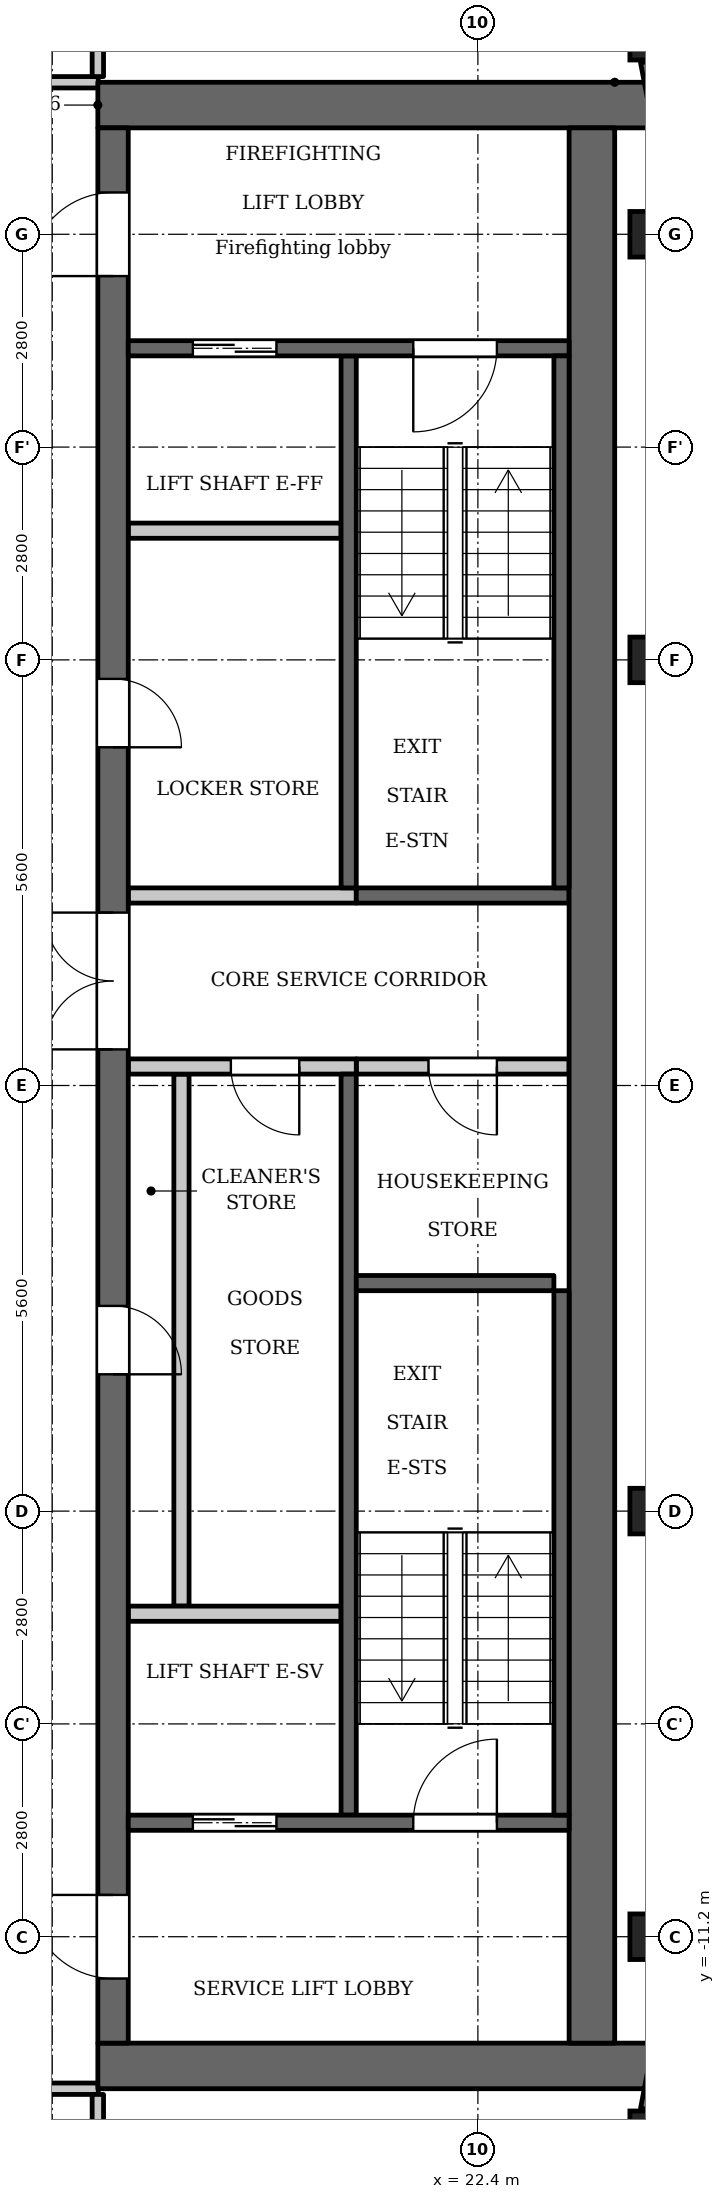
"""IFC4 building model, lengths in metres.
Left out: names, types, materials, properties, quantities, classifications, styles, units other than length and angle.
Written with IfcOpenShell. Run it as: python <this file> out.ifc"""

import sys

from ifc_helpers import new_model, si_unit, direction, frame, frame_2d, origin, origin_2d, place, context, subcontext, project, spatial, rectangle, extrude, element, fill, save


model = new_model("IFC4")
c1 = context("Model", 3, precision=1e-05, world=origin(), true_north=direction((0.0, 1.0)))
c2 = subcontext(c1, "Body", "Model", "MODEL_VIEW")
j1 = project(units=[si_unit("LENGTHUNIT", "METRE"), si_unit("PLANEANGLEUNIT", "RADIAN")], contexts=[c1])
p1 = place(None, origin())
s1 = spatial("IfcSite", under=j1, at=p1, CompositionType="ELEMENT")
p2 = place(p1, origin())
s2 = spatial("IfcBuilding", under=s1, at=p2, CompositionType="ELEMENT")
p3 = place(p2, frame((0.0, 0.0, 306.9)))
s3 = spatial("IfcBuildingStorey", under=s2, at=p3, CompositionType="ELEMENT", Elevation=306.9)
for number, where, z_axis, x_axis in (
    (1, (24.7, -13.793, 0.0), (0.0, 0.0, 1.0), (1.0, 0.0, 0.0)),
    (2, (24.7, -11.2, 0.0), (0.0, 0.0, 1.0), (1.0, 0.0, 0.0)),
    (3, (24.7, -5.6, 0.0), (0.0, 0.0, 1.0), (1.0, 0.0, 0.0)),
    (4, (24.7, 5.6, 0.0), (0.0, 0.0, 1.0), (1.0, 0.0, 0.0)),
    (5, (24.7, 11.2, 0.0), (0.0, 0.0, 1.0), (1.0, 0.0, 0.0)),
    (6, (24.7, 13.793, 0.0), (0.0, 0.0, 1.0), (1.0, 0.0, 0.0)),
):
    element("IfcColumn", number, at=place(p3, frame(where, z_axis=z_axis, x_axis=x_axis)), inside=s3, PredefinedType="COLUMN", context=c2, shape_type="SweptSolid", body=[
        extrude(rectangle(XDim=0.6, YDim=0.6, at=origin_2d()), origin(), (0.0, 0.0, 1.0), 3.5),
    ])
for number, where, z_axis, x_axis in (
    (7, (24.688, -13.485, 0.0), (0.0, 0.0, 1.0), (0.187, 0.982, 0.0)),
    (8, (25.052, 11.573, 0.0), (0.0, 0.0, 1.0), (-0.187, 0.982, 0.0)),
):
    element("IfcWall", number, at=place(p3, frame(where, z_axis=z_axis, x_axis=x_axis)), inside=s3, PredefinedType="SOLIDWALL", context=c2, shape_type="SweptSolid", body=[
        extrude(rectangle(XDim=1.947, YDim=0.3, at=frame_2d((0.973, 0.0))), origin(), (0.0, 0.0, 1.0), 2.6),
    ])
p4 = place(p3, frame((20.7, 2.6, 0.0), z_axis=(0.0, 0.0, 1.0), x_axis=(0.0, 1.0, 0.0)))
e9 = element("IfcWall", 9, at=p4, inside=s3, PredefinedType="SHEAR", context=c2, shape_type="SweptSolid", body=[
    extrude(rectangle(XDim=7.0, YDim=0.2, at=frame_2d((3.5, 0.0))), origin(), (0.0, 0.0, 1.0), 3.2),
])
p5 = place(p3, frame((20.7, -9.6, 0.0), z_axis=(0.0, 0.0, 1.0), x_axis=(0.0, 1.0, 0.0)))
e10 = element("IfcWall", 10, at=p5, inside=s3, PredefinedType="SHEAR", context=c2, shape_type="SweptSolid", body=[
    extrude(rectangle(XDim=9.75, YDim=0.2, at=frame_2d((4.875, 0.0))), origin(), (0.0, 0.0, 1.0), 3.2),
])
p6 = place(p3, frame((20.8, 2.5, 0.0), z_axis=(0.0, 0.0, 1.0), x_axis=(1.0, 0.0, 0.0)))
e11 = element("IfcWall", 11, at=p6, inside=s3, PredefinedType="SHEAR", context=c2, shape_type="SweptSolid", body=[
    extrude(rectangle(XDim=2.8, YDim=0.2, at=frame_2d((1.4, 0.0))), origin(), (0.0, 0.0, 1.0), 3.2),
])
p7 = place(p3, frame((20.8, 0.25, 0.0), z_axis=(0.0, 0.0, 1.0), x_axis=(1.0, 0.0, 0.0)))
e12 = element("IfcWall", 12, at=p7, inside=s3, PredefinedType="PARTITIONING", context=c2, shape_type="SweptSolid", body=[
    extrude(rectangle(XDim=2.8, YDim=0.2, at=frame_2d((1.4, 0.0))), origin(), (0.0, 0.0, 1.0), 3.2),
])
p8 = place(p7, frame((0.95, 0.0, 0.0)))
e13 = element("IfcOpeningElement", 13, at=p8, cuts=e12, PredefinedType="OPENING", context=c2, shape_type="SweptSolid", body=[
    extrude(rectangle(XDim=0.9, YDim=2.1, at=frame_2d((0.45, 1.05))), frame((0.0, 0.11, 0.0), z_axis=(0.0, -1.0, 0.0), x_axis=(1.0, 0.0, 0.0)), (0.0, 0.0, 1.0), 0.22),
])
for number, where, z_axis, x_axis in (
    (14, (17.4, 12.9, 0.0), (0.0, 0.0, 1.0), (1.0, 0.0, 0.0)),
    (15, (17.4, -12.9, 0.0), (0.0, 0.0, 1.0), (1.0, 0.0, 0.0)),
):
    element("IfcWall", number, at=place(p3, frame(where, z_axis=z_axis, x_axis=x_axis)), inside=s3, PredefinedType="SHEAR", context=c2, shape_type="SweptSolid", body=[
        extrude(rectangle(XDim=7.6, YDim=0.6, at=frame_2d((3.8, 0.0))), origin(), (0.0, 0.0, 1.0), 3.2),
    ])
p9 = place(p3, frame((18.5, -6.85, 0.0), z_axis=(0.0, 0.0, 1.0), x_axis=(0.0, 1.0, 0.0)))
e16 = element("IfcWall", 16, at=p9, inside=s3, PredefinedType="PARTITIONING", context=c2, shape_type="SweptSolid", body=[
    extrude(rectangle(XDim=7.0, YDim=0.2, at=frame_2d((3.5, 0.0))), origin(), (0.0, 0.0, 1.0), 3.2),
])
p10 = place(p3, frame((17.6, -12.6, 0.0), z_axis=(0.0, 0.0, 1.0), x_axis=(0.0, 1.0, 0.0)))
e17 = element("IfcWall", 17, at=p10, inside=s3, PredefinedType="SHEAR", context=c2, shape_type="SweptSolid", body=[
    extrude(rectangle(XDim=25.2, YDim=0.4, at=frame_2d((12.6, 0.0))), origin(), (0.0, 0.0, 1.0), 3.2),
])
p11 = place(p10, frame((8.8, 0.0, 0.0)))
e18 = element("IfcOpeningElement", 18, at=p11, cuts=e17, PredefinedType="OPENING", context=c2, shape_type="SweptSolid", body=[
    extrude(rectangle(XDim=0.9, YDim=2.1, at=frame_2d((0.45, 1.05))), frame((0.0, 0.21, 0.0), z_axis=(0.0, -1.0, 0.0), x_axis=(1.0, 0.0, 0.0)), (0.0, 0.0, 1.0), 0.42),
])
p12 = place(p10, frame((17.05, 0.0, 0.0)))
e19 = element("IfcOpeningElement", 19, at=p12, cuts=e17, PredefinedType="OPENING", context=c2, shape_type="SweptSolid", body=[
    extrude(rectangle(XDim=0.9, YDim=2.1, at=frame_2d((0.45, 1.05))), frame((0.0, 0.21, 0.0), z_axis=(0.0, -1.0, 0.0), x_axis=(1.0, 0.0, 0.0)), (0.0, 0.0, 1.0), 0.42),
])
p13 = place(p10, frame((23.25, 0.0, 0.0)))
e20 = element("IfcOpeningElement", 20, at=p13, cuts=e17, PredefinedType="OPENING", context=c2, shape_type="SweptSolid", body=[
    extrude(rectangle(XDim=1.1, YDim=2.1, at=frame_2d((0.55, 1.05))), frame((0.0, 0.21, 0.0), z_axis=(0.0, -1.0, 0.0), x_axis=(1.0, 0.0, 0.0)), (0.0, 0.0, 1.0), 0.42),
])
p14 = place(p10, frame((0.85, 0.0, 0.0)))
e21 = element("IfcOpeningElement", 21, at=p14, cuts=e17, PredefinedType="OPENING", context=c2, shape_type="SweptSolid", body=[
    extrude(rectangle(XDim=1.1, YDim=2.1, at=frame_2d((0.55, 1.05))), frame((0.0, 0.21, 0.0), z_axis=(0.0, -1.0, 0.0), x_axis=(1.0, 0.0, 0.0)), (0.0, 0.0, 1.0), 0.42),
])
p15 = place(p10, frame((13.075, 0.0, 0.0)))
e22 = element("IfcOpeningElement", 22, at=p15, cuts=e17, PredefinedType="OPENING", context=c2, shape_type="SweptSolid", body=[
    extrude(rectangle(XDim=1.8, YDim=2.1, at=frame_2d((0.9, 1.05))), frame((0.0, 0.21, 0.0), z_axis=(0.0, -1.0, 0.0), x_axis=(1.0, 0.0, 0.0)), (0.0, 0.0, 1.0), 0.42),
])
p16 = place(p3, frame((23.9, -12.6, 0.0), z_axis=(0.0, 0.0, 1.0), x_axis=(0.0, 1.0, 0.0)))
e23 = element("IfcWall", 23, at=p16, inside=s3, PredefinedType="SHEAR", context=c2, shape_type="SweptSolid", body=[
    extrude(rectangle(XDim=25.2, YDim=0.6, at=frame_2d((12.6, 0.0))), origin(), (0.0, 0.0, 1.0), 3.2),
])
p17 = place(p3, frame((17.8, -9.7, 0.0), z_axis=(0.0, 0.0, 1.0), x_axis=(1.0, 0.0, 0.0)))
e24 = element("IfcWall", 24, at=p17, inside=s3, PredefinedType="SHEAR", context=c2, shape_type="SweptSolid", body=[
    extrude(rectangle(XDim=5.8, YDim=0.2, at=frame_2d((2.9, 0.0))), origin(), (0.0, 0.0, 1.0), 3.2),
])
p18 = place(p17, frame((0.85, 0.0, 0.0)))
e25 = element("IfcOpeningElement", 25, at=p18, cuts=e24, PredefinedType="OPENING", context=c2, shape_type="SweptSolid", body=[
    extrude(rectangle(XDim=1.1, YDim=2.1, at=frame_2d((0.55, 1.05))), frame((0.0, 0.11, 0.0), z_axis=(0.0, -1.0, 0.0), x_axis=(1.0, 0.0, 0.0)), (0.0, 0.0, 1.0), 0.22),
])
p19 = place(p17, frame((3.75, 0.0, 0.0)))
e26 = element("IfcOpeningElement", 26, at=p19, cuts=e24, PredefinedType="OPENING", context=c2, shape_type="SweptSolid", body=[
    extrude(rectangle(XDim=1.1, YDim=2.1, at=frame_2d((0.55, 1.05))), frame((0.0, 0.11, 0.0), z_axis=(0.0, -1.0, 0.0), x_axis=(1.0, 0.0, 0.0)), (0.0, 0.0, 1.0), 0.22),
])
p20 = place(p3, frame((17.8, -6.95, 0.0), z_axis=(0.0, 0.0, 1.0), x_axis=(1.0, 0.0, 0.0)))
e27 = element("IfcWall", 27, at=p20, inside=s3, PredefinedType="PARTITIONING", context=c2, shape_type="SweptSolid", body=[
    extrude(rectangle(XDim=2.8, YDim=0.2, at=frame_2d((1.4, 0.0))), origin(), (0.0, 0.0, 1.0), 3.2),
])
p21 = place(p3, frame((17.8, 0.25, 0.0), z_axis=(0.0, 0.0, 1.0), x_axis=(1.0, 0.0, 0.0)))
e28 = element("IfcWall", 28, at=p21, inside=s3, PredefinedType="PARTITIONING", context=c2, shape_type="SweptSolid", body=[
    extrude(rectangle(XDim=3.0, YDim=0.2, at=frame_2d((1.5, 0.0))), origin(), (0.0, 0.0, 1.0), 3.2),
])
p22 = place(p21, frame((1.35, 0.0, 0.0)))
e29 = element("IfcOpeningElement", 29, at=p22, cuts=e28, PredefinedType="OPENING", context=c2, shape_type="SweptSolid", body=[
    extrude(rectangle(XDim=0.9, YDim=2.1, at=frame_2d((0.45, 1.05))), frame((0.0, 0.11, 0.0), z_axis=(0.0, -1.0, 0.0), x_axis=(1.0, 0.0, 0.0)), (0.0, 0.0, 1.0), 0.22),
])
p23 = place(p3, frame((17.8, 2.5, 0.0), z_axis=(0.0, 0.0, 1.0), x_axis=(1.0, 0.0, 0.0)))
e30 = element("IfcWall", 30, at=p23, inside=s3, PredefinedType="PARTITIONING", context=c2, shape_type="SweptSolid", body=[
    extrude(rectangle(XDim=3.0, YDim=0.2, at=frame_2d((1.5, 0.0))), origin(), (0.0, 0.0, 1.0), 3.2),
])
p24 = place(p3, frame((17.8, 7.3, 0.0), z_axis=(0.0, 0.0, 1.0), x_axis=(1.0, 0.0, 0.0)))
e31 = element("IfcWall", 31, at=p24, inside=s3, PredefinedType="PARTITIONING", context=c2, shape_type="SweptSolid", body=[
    extrude(rectangle(XDim=2.8, YDim=0.2, at=frame_2d((1.4, 0.0))), origin(), (0.0, 0.0, 1.0), 3.2),
])
p25 = place(p3, frame((17.8, 9.7, 0.0), z_axis=(0.0, 0.0, 1.0), x_axis=(1.0, 0.0, 0.0)))
e32 = element("IfcWall", 32, at=p25, inside=s3, PredefinedType="SHEAR", context=c2, shape_type="SweptSolid", body=[
    extrude(rectangle(XDim=5.8, YDim=0.2, at=frame_2d((2.9, 0.0))), origin(), (0.0, 0.0, 1.0), 3.2),
])
p26 = place(p25, frame((0.85, 0.0, 0.0)))
e33 = element("IfcOpeningElement", 33, at=p26, cuts=e32, PredefinedType="OPENING", context=c2, shape_type="SweptSolid", body=[
    extrude(rectangle(XDim=1.1, YDim=2.1, at=frame_2d((0.55, 1.05))), frame((0.0, 0.11, 0.0), z_axis=(0.0, -1.0, 0.0), x_axis=(1.0, 0.0, 0.0)), (0.0, 0.0, 1.0), 0.22),
])
p27 = place(p25, frame((3.75, 0.0, 0.0)))
e34 = element("IfcOpeningElement", 34, at=p27, cuts=e32, PredefinedType="OPENING", context=c2, shape_type="SweptSolid", body=[
    extrude(rectangle(XDim=1.1, YDim=2.1, at=frame_2d((0.55, 1.05))), frame((0.0, 0.11, 0.0), z_axis=(0.0, -1.0, 0.0), x_axis=(1.0, 0.0, 0.0)), (0.0, 0.0, 1.0), 0.22),
])
p28 = place(p3, frame((23.5, 2.6, 0.0), z_axis=(0.0, 0.0, 1.0), x_axis=(0.0, 1.0, 0.0)))
e35 = element("IfcWall", 35, at=p28, inside=s3, PredefinedType="SHEAR", context=c2, shape_type="SweptSolid", body=[
    extrude(rectangle(XDim=7.0, YDim=0.2, at=frame_2d((3.5, 0.0))), origin(), (0.0, 0.0, 1.0), 3.2),
])
p29 = place(p3, frame((23.5, -9.6, 0.0), z_axis=(0.0, 0.0, 1.0), x_axis=(0.0, 1.0, 0.0)))
e36 = element("IfcWall", 36, at=p29, inside=s3, PredefinedType="SHEAR", context=c2, shape_type="SweptSolid", body=[
    extrude(rectangle(XDim=6.9, YDim=0.2, at=frame_2d((3.45, 0.0))), origin(), (0.0, 0.0, 1.0), 3.2),
])
p30 = place(p3, frame((20.8, -2.6, 0.0), z_axis=(0.0, 0.0, 1.0), x_axis=(1.0, 0.0, 0.0)))
e37 = element("IfcWall", 37, at=p30, inside=s3, PredefinedType="SHEAR", context=c2, shape_type="SweptSolid", body=[
    extrude(rectangle(XDim=2.6, YDim=0.2, at=frame_2d((1.3, 0.0))), origin(), (0.0, 0.0, 1.0), 3.2),
])
p31 = place(p3, frame((15.32, -13.2, 0.0), z_axis=(0.0, 0.0, 1.0), x_axis=(1.0, 0.0, 0.0)))
e38 = element("IfcWall", 38, at=p31, inside=s3, PredefinedType="PARTITIONING", context=c2, shape_type="SweptSolid", body=[
    extrude(rectangle(XDim=2.085, YDim=0.15, at=frame_2d((1.042, 0.0))), origin(), (0.0, 0.0, 1.0), 3.2),
])
p32 = place(p31, frame((0.42, 0.0, 0.0)))
e39 = element("IfcOpeningElement", 39, at=p32, cuts=e38, PredefinedType="OPENING", context=c2, shape_type="SweptSolid", body=[
    extrude(rectangle(XDim=1.0, YDim=2.1, at=frame_2d((0.5, 1.05))), frame((0.0, 0.085, 0.0), z_axis=(0.0, -1.0, 0.0), x_axis=(1.0, 0.0, 0.0)), (0.0, 0.0, 1.0), 0.17),
])
p33 = place(p3, frame((15.32, 13.2, 0.0), z_axis=(0.0, 0.0, 1.0), x_axis=(1.0, 0.0, 0.0)))
e40 = element("IfcWall", 40, at=p33, inside=s3, PredefinedType="PARTITIONING", context=c2, shape_type="SweptSolid", body=[
    extrude(rectangle(XDim=2.085, YDim=0.15, at=frame_2d((1.042, 0.0))), origin(), (0.0, 0.0, 1.0), 3.2),
])
p34 = place(p33, frame((0.43, 0.0, 0.0)))
e41 = element("IfcOpeningElement", 41, at=p34, cuts=e40, PredefinedType="OPENING", context=c2, shape_type="SweptSolid", body=[
    extrude(rectangle(XDim=1.0, YDim=2.1, at=frame_2d((0.5, 1.05))), frame((0.0, 0.085, 0.0), z_axis=(0.0, -1.0, 0.0), x_axis=(1.0, 0.0, 0.0)), (0.0, 0.0, 1.0), 0.17),
])
p35 = place(p3, frame((17.4, -19.236, 0.0), z_axis=(0.0, 0.0, 1.0), x_axis=(0.0, 1.0, 0.0)))
e42 = element("IfcWall", 42, at=p35, inside=s3, PredefinedType="PARTITIONING", context=c2, shape_type="SweptSolid", body=[
    extrude(rectangle(XDim=5.961, YDim=0.15, at=frame_2d((2.981, 0.0))), origin(), (0.0, 0.0, 1.0), 3.2),
])
p36 = place(p35, frame((3.917, 0.0, 0.0)))
e43 = element("IfcOpeningElement", 43, at=p36, cuts=e42, PredefinedType="OPENING", context=c2, shape_type="SweptSolid", body=[
    extrude(rectangle(XDim=1.0, YDim=2.1, at=frame_2d((0.5, 1.05))), frame((0.0, 0.085, 0.0), z_axis=(0.0, -1.0, 0.0), x_axis=(1.0, 0.0, 0.0)), (0.0, 0.0, 1.0), 0.17),
])
p37 = place(p3, frame((17.4, 13.275, 0.0), z_axis=(0.0, 0.0, 1.0), x_axis=(0.0, 1.0, 0.0)))
e44 = element("IfcWall", 44, at=p37, inside=s3, PredefinedType="PARTITIONING", context=c2, shape_type="SweptSolid", body=[
    extrude(rectangle(XDim=5.961, YDim=0.15, at=frame_2d((2.981, 0.0))), origin(), (0.0, 0.0, 1.0), 3.2),
])
p38 = place(p37, frame((4.575, 0.0, 0.0)))
e45 = element("IfcOpeningElement", 45, at=p38, cuts=e44, PredefinedType="OPENING", context=c2, shape_type="SweptSolid", body=[
    extrude(rectangle(XDim=1.0, YDim=2.1, at=frame_2d((0.5, 1.05))), frame((0.0, 0.085, 0.0), z_axis=(0.0, -1.0, 0.0), x_axis=(1.0, 0.0, 0.0)), (0.0, 0.0, 1.0), 0.17),
])
p39 = place(p18, origin())
e46 = element("IfcDoor", 46, at=p39, inside=s3, OperationType="DOUBLE_DOOR_SLIDING", PredefinedType="DOOR", context=c2, shape_type="SweptSolid", body=[
    extrude(rectangle(XDim=1.1, YDim=2.1, at=frame_2d((0.55, 1.05))), frame((0.0, 0.025, 0.0), z_axis=(0.0, -1.0, 0.0), x_axis=(1.0, 0.0, 0.0)), (0.0, 0.0, 1.0), 0.05),
])
fill(e25, e46)
p40 = place(p11, origin())
e47 = element("IfcDoor", 47, at=p40, inside=s3, OperationType="SINGLE_SWING_LEFT", PredefinedType="DOOR", context=c2, shape_type="SweptSolid", body=[
    extrude(rectangle(XDim=0.9, YDim=2.1, at=frame_2d((0.45, 1.05))), frame((0.0, 0.025, 0.0), z_axis=(0.0, -1.0, 0.0), x_axis=(1.0, 0.0, 0.0)), (0.0, 0.0, 1.0), 0.05),
])
fill(e18, e47)
p41 = place(p22, origin())
e48 = element("IfcDoor", 48, at=p41, inside=s3, OperationType="SINGLE_SWING_RIGHT", PredefinedType="DOOR", context=c2, shape_type="SweptSolid", body=[
    extrude(rectangle(XDim=0.9, YDim=2.1, at=frame_2d((0.45, 1.05))), frame((0.0, 0.025, 0.0), z_axis=(0.0, -1.0, 0.0), x_axis=(1.0, 0.0, 0.0)), (0.0, 0.0, 1.0), 0.05),
])
fill(e29, e48)
p42 = place(p12, origin())
e49 = element("IfcDoor", 49, at=p42, inside=s3, OperationType="SINGLE_SWING_LEFT", PredefinedType="DOOR", context=c2, shape_type="SweptSolid", body=[
    extrude(rectangle(XDim=0.9, YDim=2.1, at=frame_2d((0.45, 1.05))), frame((0.0, 0.025, 0.0), z_axis=(0.0, -1.0, 0.0), x_axis=(1.0, 0.0, 0.0)), (0.0, 0.0, 1.0), 0.05),
])
fill(e19, e49)
p43 = place(p26, origin())
e50 = element("IfcDoor", 50, at=p43, inside=s3, OperationType="DOUBLE_DOOR_SLIDING", PredefinedType="DOOR", context=c2, shape_type="SweptSolid", body=[
    extrude(rectangle(XDim=1.1, YDim=2.1, at=frame_2d((0.55, 1.05))), frame((0.0, 0.025, 0.0), z_axis=(0.0, -1.0, 0.0), x_axis=(1.0, 0.0, 0.0)), (0.0, 0.0, 1.0), 0.05),
])
fill(e33, e50)
p44 = place(p13, origin())
e51 = element("IfcDoor", 51, at=p44, inside=s3, OperationType="SINGLE_SWING_RIGHT", PredefinedType="DOOR", context=c2, shape_type="SweptSolid", body=[
    extrude(rectangle(XDim=1.1, YDim=2.1, at=frame_2d((0.55, 1.05))), frame((0.0, 0.025, 0.0), z_axis=(0.0, -1.0, 0.0), x_axis=(1.0, 0.0, 0.0)), (0.0, 0.0, 1.0), 0.05),
])
fill(e20, e51)
p45 = place(p14, origin())
e52 = element("IfcDoor", 52, at=p45, inside=s3, OperationType="SINGLE_SWING_LEFT", PredefinedType="DOOR", context=c2, shape_type="SweptSolid", body=[
    extrude(rectangle(XDim=1.1, YDim=2.1, at=frame_2d((0.55, 1.05))), frame((0.0, 0.025, 0.0), z_axis=(0.0, -1.0, 0.0), x_axis=(1.0, 0.0, 0.0)), (0.0, 0.0, 1.0), 0.05),
])
fill(e21, e52)
p46 = place(p27, origin())
e53 = element("IfcDoor", 53, at=p46, inside=s3, OperationType="SINGLE_SWING_LEFT", PredefinedType="DOOR", context=c2, shape_type="SweptSolid", body=[
    extrude(rectangle(XDim=1.1, YDim=2.1, at=frame_2d((0.55, 1.05))), frame((0.0, 0.025, 0.0), z_axis=(0.0, -1.0, 0.0), x_axis=(1.0, 0.0, 0.0)), (0.0, 0.0, 1.0), 0.05),
])
fill(e34, e53)
p47 = place(p19, origin())
e54 = element("IfcDoor", 54, at=p47, inside=s3, OperationType="SINGLE_SWING_LEFT", PredefinedType="DOOR", context=c2, shape_type="SweptSolid", body=[
    extrude(rectangle(XDim=1.1, YDim=2.1, at=frame_2d((0.55, 1.05))), frame((0.0, 0.025, 0.0), z_axis=(0.0, -1.0, 0.0), x_axis=(1.0, 0.0, 0.0)), (0.0, 0.0, 1.0), 0.05),
])
fill(e26, e54)
p48 = place(p15, origin())
e55 = element("IfcDoor", 55, at=p48, inside=s3, OperationType="DOUBLE_DOOR_SINGLE_SWING", PredefinedType="DOOR", context=c2, shape_type="SweptSolid", body=[
    extrude(rectangle(XDim=1.8, YDim=2.1, at=frame_2d((0.9, 1.05))), frame((0.0, 0.025, 0.0), z_axis=(0.0, -1.0, 0.0), x_axis=(1.0, 0.0, 0.0)), (0.0, 0.0, 1.0), 0.05),
])
fill(e22, e55)
p49 = place(p8, origin())
e56 = element("IfcDoor", 56, at=p49, inside=s3, OperationType="SINGLE_SWING_RIGHT", PredefinedType="DOOR", context=c2, shape_type="SweptSolid", body=[
    extrude(rectangle(XDim=0.9, YDim=2.1, at=frame_2d((0.45, 1.05))), frame((0.0, 0.025, 0.0), z_axis=(0.0, -1.0, 0.0), x_axis=(1.0, 0.0, 0.0)), (0.0, 0.0, 1.0), 0.05),
])
fill(e13, e56)
save(model, sys.argv[1])
